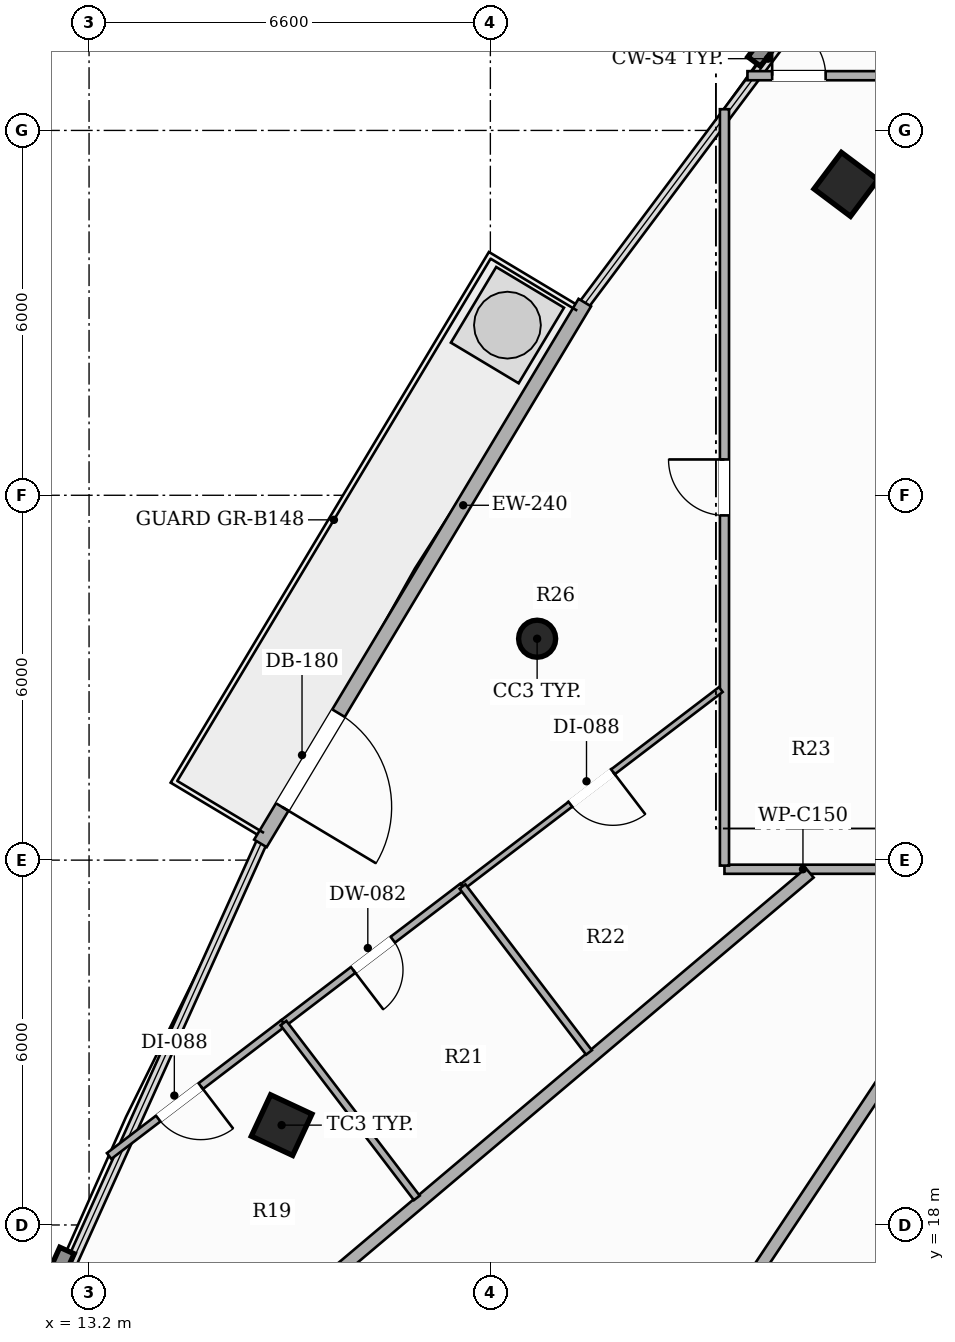
"""IFC4 building model, lengths in metres.
Left out: names, types, materials, properties, quantities, classifications, styles, units other than length and angle.
Written with IfcOpenShell. Run it as: python <this file> out.ifc"""

import sys

from ifc_helpers import new_model, si_unit, direction, frame, frame_2d, origin, origin_2d, place, context, subcontext, project, spatial, rectangle, hollow_rectangle, hollow_circle, extrude, element, fill, save


model = new_model("IFC4")
c1 = context("Model", 3, precision=1e-05, world=origin(), true_north=direction((0.0, 1.0)))
c2 = subcontext(c1, "Body", "Model", "MODEL_VIEW")
j1 = project(units=[si_unit("LENGTHUNIT", "METRE"), si_unit("PLANEANGLEUNIT", "RADIAN")], contexts=[c1])
p1 = place(None, origin())
s1 = spatial("IfcSite", under=j1, at=p1, CompositionType="ELEMENT")
p2 = place(p1, origin())
s2 = spatial("IfcBuilding", under=s1, at=p2, CompositionType="ELEMENT")
p3 = place(p2, frame((0.0, 0.0, 209.6)))
s3 = spatial("IfcBuildingStorey", under=s2, at=p3, CompositionType="ELEMENT", Elevation=209.6)
p4 = place(p3, frame((25.648, 35.113, 0.0), z_axis=(0.0, 0.0, 1.0), x_axis=(0.600420225326, 0.799684658487, 0.0)))
e1 = element("IfcColumn", 1, at=p4, inside=s3, PredefinedType="COLUMN", context=c2, shape_type="SweptSolid", body=[
    extrude(hollow_rectangle(XDim=0.75, YDim=0.75, WallThickness=0.025, at=origin_2d()), origin(), (0.0, 0.0, 1.0), 3.3),
])
p5 = place(p3, frame((20.569, 27.641, 0.0), z_axis=(0.0, 0.0, 1.0), x_axis=(1.0, 0.0, 0.0)))
e2 = element("IfcColumn", 2, at=p5, inside=s3, PredefinedType="COLUMN", context=c2, shape_type="SweptSolid", body=[
    extrude(hollow_circle(Radius=0.305, WallThickness=0.016, at=origin_2d()), origin(), (0.0, 0.0, 1.0), 3.3),
])
p6 = place(p3, frame((16.367, 19.642, 0.0), z_axis=(0.0, 0.0, 1.0), x_axis=(0.422618261741, 0.906307787037, 0.0)))
e3 = element("IfcColumn", 3, at=p6, inside=s3, PredefinedType="COLUMN", context=c2, shape_type="SweptSolid", body=[
    extrude(hollow_rectangle(XDim=0.75, YDim=0.75, WallThickness=0.025, at=origin_2d()), origin(), (0.0, 0.0, 1.0), 3.3),
])
p7 = place(p3, frame((21.353, 33.169, 0.0), z_axis=(0.0, 0.0, 1.0), x_axis=(-0.514391899557, -0.857555230682, 0.0)))
e4 = element("IfcWall", 4, at=p7, inside=s3, PredefinedType="SOLIDWALL", context=c2, shape_type="SweptSolid", body=[
    extrude(rectangle(XDim=10.371, YDim=0.24, at=frame_2d((5.186, 0.0))), origin(), (0.0, 0.0, 1.0), 2.624),
])
p8 = place(p7, frame((7.874, 0.0, 0.0)))
e5 = element("IfcOpeningElement", 5, at=p8, cuts=e4, PredefinedType="OPENING", context=c2, shape_type="SweptSolid", body=[
    extrude(rectangle(XDim=1.8, YDim=2.2, at=frame_2d((0.9, 1.1))), frame((0.0, 0.13, 0.0), z_axis=(0.0, -1.0, 0.0), x_axis=(1.0, 0.0, 0.0)), (0.0, 0.0, 1.0), 0.26),
])
p9 = place(p3, frame((32.05, 23.85, 0.0), z_axis=(0.0, 0.0, 1.0), x_axis=(-1.0, 0.0, 0.0)))
e6 = element("IfcWall", 6, at=p9, inside=s3, PredefinedType="PARTITIONING", context=c2, shape_type="SweptSolid", body=[
    extrude(rectangle(XDim=8.4, YDim=0.15, at=frame_2d((4.2, 0.0))), origin(), (0.0, 0.0, 1.0), 2.565),
])
p10 = place(p9, frame((1.446, 0.0, 0.0)))
e7 = element("IfcOpeningElement", 7, at=p10, cuts=e6, PredefinedType="OPENING", context=c2, shape_type="SweptSolid", body=[
    extrude(rectangle(XDim=0.92, YDim=2.15, at=frame_2d((0.46, 1.075))), frame((0.0, 0.085, 0.0), z_axis=(0.0, -1.0, 0.0), x_axis=(1.0, 0.0, 0.0)), (0.0, 0.0, 1.0), 0.17),
])
p11 = place(p9, frame((4.798, 0.0, 0.0)))
e8 = element("IfcOpeningElement", 8, at=p11, cuts=e6, PredefinedType="OPENING", context=c2, shape_type="SweptSolid", body=[
    extrude(rectangle(XDim=0.92, YDim=2.15, at=frame_2d((0.46, 1.075))), frame((0.0, 0.085, 0.0), z_axis=(0.0, -1.0, 0.0), x_axis=(1.0, 0.0, 0.0)), (0.0, 0.0, 1.0), 0.17),
])
p12 = place(p3, frame((23.65, 23.91, 0.0), z_axis=(0.0, 0.0, 1.0), x_axis=(0.0, 1.0, 0.0)))
e9 = element("IfcWall", 9, at=p12, inside=s3, PredefinedType="PARTITIONING", context=c2, shape_type="SweptSolid", body=[
    extrude(rectangle(XDim=12.439, YDim=0.15, at=frame_2d((6.22, 0.0))), origin(), (0.0, 0.0, 1.0), 2.492),
])
p13 = place(p12, frame((5.759, 0.0, 0.0)))
e10 = element("IfcOpeningElement", 10, at=p13, cuts=e9, PredefinedType="OPENING", context=c2, shape_type="SweptSolid", body=[
    extrude(rectangle(XDim=0.92, YDim=2.15, at=frame_2d((0.46, 1.075))), frame((0.0, 0.085, 0.0), z_axis=(0.0, -1.0, 0.0), x_axis=(1.0, 0.0, 0.0)), (0.0, 0.0, 1.0), 0.17),
])
p14 = place(p3, frame((24.028, 36.9, 0.0), z_axis=(0.0, 0.0, 1.0), x_axis=(1.0, 0.0, 0.0)))
e11 = element("IfcWall", 11, at=p14, inside=s3, PredefinedType="PARTITIONING", context=c2, shape_type="SweptSolid", body=[
    extrude(rectangle(XDim=2.122, YDim=0.15, at=frame_2d((1.061, 0.0))), origin(), (0.0, 0.0, 1.0), 2.619),
])
p15 = place(p14, frame((0.406, 0.0, 0.0)))
e12 = element("IfcOpeningElement", 12, at=p15, cuts=e11, PredefinedType="OPENING", context=c2, shape_type="SweptSolid", body=[
    extrude(rectangle(XDim=0.88, YDim=2.1, at=frame_2d((0.44, 1.05))), frame((0.0, 0.085, 0.0), z_axis=(0.0, -1.0, 0.0), x_axis=(1.0, 0.0, 0.0)), (0.0, 0.0, 1.0), 0.17),
])
p16 = place(p3, frame((16.618, 5.846, 0.0), z_axis=(0.0, 0.0, 1.0), x_axis=(0.553425992232, 0.832898355817, 0.0)))
e13 = element("IfcWall", 13, at=p16, inside=s3, PredefinedType="PARTITIONING", context=c2, shape_type="SweptSolid", body=[
    extrude(rectangle(XDim=21.544, YDim=0.2, at=frame_2d((10.772, 0.0))), origin(), (0.0, 0.0, 1.0), 2.492),
])
p17 = place(p3, frame((10.087, 11.156, 0.0), z_axis=(0.0, 0.0, 1.0), x_axis=(0.76410924632, 0.645086862127, 0.0)))
e14 = element("IfcWall", 14, at=p17, inside=s3, PredefinedType="PARTITIONING", context=c2, shape_type="SweptSolid", body=[
    extrude(rectangle(XDim=19.585, YDim=0.2, at=frame_2d((9.792, 0.0))), origin(), (0.0, 0.0, 1.0), 2.492),
])
p18 = place(p3, frame((19.342, 23.566, 0.0), z_axis=(0.0, 0.0, 1.0), x_axis=(-0.795172892053, -0.606382776589, 0.0)))
e15 = element("IfcWall", 15, at=p18, inside=s3, PredefinedType="PARTITIONING", context=c2, shape_type="SweptSolid", body=[
    extrude(rectangle(XDim=3.704, YDim=0.12, at=frame_2d((1.852, 0.0))), origin(), (0.0, 0.0, 1.0), 2.492),
])
p19 = place(p18, frame((1.442, 0.0, 0.0)))
e16 = element("IfcOpeningElement", 16, at=p19, cuts=e15, PredefinedType="OPENING", context=c2, shape_type="SweptSolid", body=[
    extrude(rectangle(XDim=0.82, YDim=2.1, at=frame_2d((0.41, 1.05))), frame((0.0, 0.07, 0.0), z_axis=(0.0, -1.0, 0.0), x_axis=(1.0, 0.0, 0.0)), (0.0, 0.0, 1.0), 0.14),
])
p20 = place(p3, frame((16.397, 21.32, 0.0), z_axis=(0.0, 0.0, 1.0), x_axis=(-0.795204709159, -0.606341051333, 0.0)))
e17 = element("IfcWall", 17, at=p20, inside=s3, PredefinedType="PARTITIONING", context=c2, shape_type="SweptSolid", body=[
    extrude(rectangle(XDim=3.605, YDim=0.12, at=frame_2d((1.803, 0.0))), origin(), (0.0, 0.0, 1.0), 3.06),
])
p21 = place(p20, frame((1.71, 0.0, 0.0)))
e18 = element("IfcOpeningElement", 18, at=p21, cuts=e17, PredefinedType="OPENING", context=c2, shape_type="SweptSolid", body=[
    extrude(rectangle(XDim=0.88, YDim=2.1, at=frame_2d((0.44, 1.05))), frame((0.0, 0.07, 0.0), z_axis=(0.0, -1.0, 0.0), x_axis=(1.0, 0.0, 0.0)), (0.0, 0.0, 1.0), 0.14),
])
p22 = place(p3, frame((23.59, 26.805, 0.0), z_axis=(0.0, 0.0, 1.0), x_axis=(-0.795214502583, -0.606328207228, 0.0)))
e19 = element("IfcWall", 19, at=p22, inside=s3, PredefinedType="PARTITIONING", context=c2, shape_type="SweptSolid", body=[
    extrude(rectangle(XDim=5.342, YDim=0.1, at=frame_2d((2.671, 0.0))), origin(), (0.0, 0.0, 1.0), 2.773),
])
p23 = place(p22, frame((2.231, 0.0, 0.0)))
e20 = element("IfcOpeningElement", 20, at=p23, cuts=e19, PredefinedType="OPENING", context=c2, shape_type="SweptSolid", body=[
    extrude(rectangle(XDim=0.88, YDim=2.1, at=frame_2d((0.44, 1.05))), frame((0.0, 0.06, 0.0), z_axis=(0.0, -1.0, 0.0), x_axis=(1.0, 0.0, 0.0)), (0.0, 0.0, 1.0), 0.12),
])
p24 = place(p3, frame((18.59, 18.445, 0.0), z_axis=(0.0, 0.0, 1.0), x_axis=(-0.606504882674, 0.795079761591, 0.0)))
e21 = element("IfcWall", 21, at=p24, inside=s3, PredefinedType="PARTITIONING", context=c2, shape_type="SweptSolid", body=[
    extrude(rectangle(XDim=3.616, YDim=0.12, at=frame_2d((1.808, 0.0))), origin(), (0.0, 0.0, 1.0), 2.492),
])
p25 = place(p3, frame((19.342, 23.566, 0.0), z_axis=(0.0, 0.0, 1.0), x_axis=(0.60619754922, -0.795314108589, 0.0)))
e22 = element("IfcWall", 22, at=p25, inside=s3, PredefinedType="PARTITIONING", context=c2, shape_type="SweptSolid", body=[
    extrude(rectangle(XDim=3.431, YDim=0.12, at=frame_2d((1.716, 0.0))), origin(), (0.0, 0.0, 1.0), 2.773),
])
p26 = place(p8, origin())
e23 = element("IfcDoor", 23, at=p26, inside=s3, OperationType="SINGLE_SWING_RIGHT", PredefinedType="DOOR", context=c2, shape_type="SweptSolid", body=[
    extrude(rectangle(XDim=1.8, YDim=2.2, at=frame_2d((0.9, 1.1))), frame((0.0, 0.025, 0.0), z_axis=(0.0, -1.0, 0.0), x_axis=(1.0, 0.0, 0.0)), (0.0, 0.0, 1.0), 0.05),
])
fill(e5, e23)
p27 = place(p13, origin())
e24 = element("IfcDoor", 24, at=p27, inside=s3, OperationType="SINGLE_SWING_RIGHT", PredefinedType="DOOR", context=c2, shape_type="SweptSolid", body=[
    extrude(rectangle(XDim=0.92, YDim=2.15, at=frame_2d((0.46, 1.075))), frame((0.0, 0.025, 0.0), z_axis=(0.0, -1.0, 0.0), x_axis=(1.0, 0.0, 0.0)), (0.0, 0.0, 1.0), 0.05),
])
fill(e10, e24)
p28 = place(p19, origin())
e25 = element("IfcDoor", 25, at=p28, inside=s3, OperationType="SINGLE_SWING_RIGHT", PredefinedType="DOOR", context=c2, shape_type="SweptSolid", body=[
    extrude(rectangle(XDim=0.82, YDim=2.1, at=frame_2d((0.41, 1.05))), frame((0.0, 0.025, 0.0), z_axis=(0.0, -1.0, 0.0), x_axis=(1.0, 0.0, 0.0)), (0.0, 0.0, 1.0), 0.05),
])
fill(e16, e25)
p29 = place(p21, origin())
e26 = element("IfcDoor", 26, at=p29, inside=s3, OperationType="SINGLE_SWING_LEFT", PredefinedType="DOOR", context=c2, shape_type="SweptSolid", body=[
    extrude(rectangle(XDim=0.88, YDim=2.1, at=frame_2d((0.44, 1.05))), frame((0.0, 0.025, 0.0), z_axis=(0.0, -1.0, 0.0), x_axis=(1.0, 0.0, 0.0)), (0.0, 0.0, 1.0), 0.05),
])
fill(e18, e26)
p30 = place(p23, origin())
e27 = element("IfcDoor", 27, at=p30, inside=s3, OperationType="SINGLE_SWING_LEFT", PredefinedType="DOOR", context=c2, shape_type="SweptSolid", body=[
    extrude(rectangle(XDim=0.88, YDim=2.1, at=frame_2d((0.44, 1.05))), frame((0.0, 0.025, 0.0), z_axis=(0.0, -1.0, 0.0), x_axis=(1.0, 0.0, 0.0)), (0.0, 0.0, 1.0), 0.05),
])
fill(e20, e27)
p31 = place(p15, origin())
e28 = element("IfcDoor", 28, at=p31, inside=s3, OperationType="SINGLE_SWING_LEFT", PredefinedType="DOOR", context=c2, shape_type="SweptSolid", body=[
    extrude(rectangle(XDim=0.88, YDim=2.1, at=frame_2d((0.44, 1.05))), frame((0.0, 0.025, 0.0), z_axis=(0.0, -1.0, 0.0), x_axis=(1.0, 0.0, 0.0)), (0.0, 0.0, 1.0), 0.05),
])
fill(e12, e28)
save(model, sys.argv[1])
